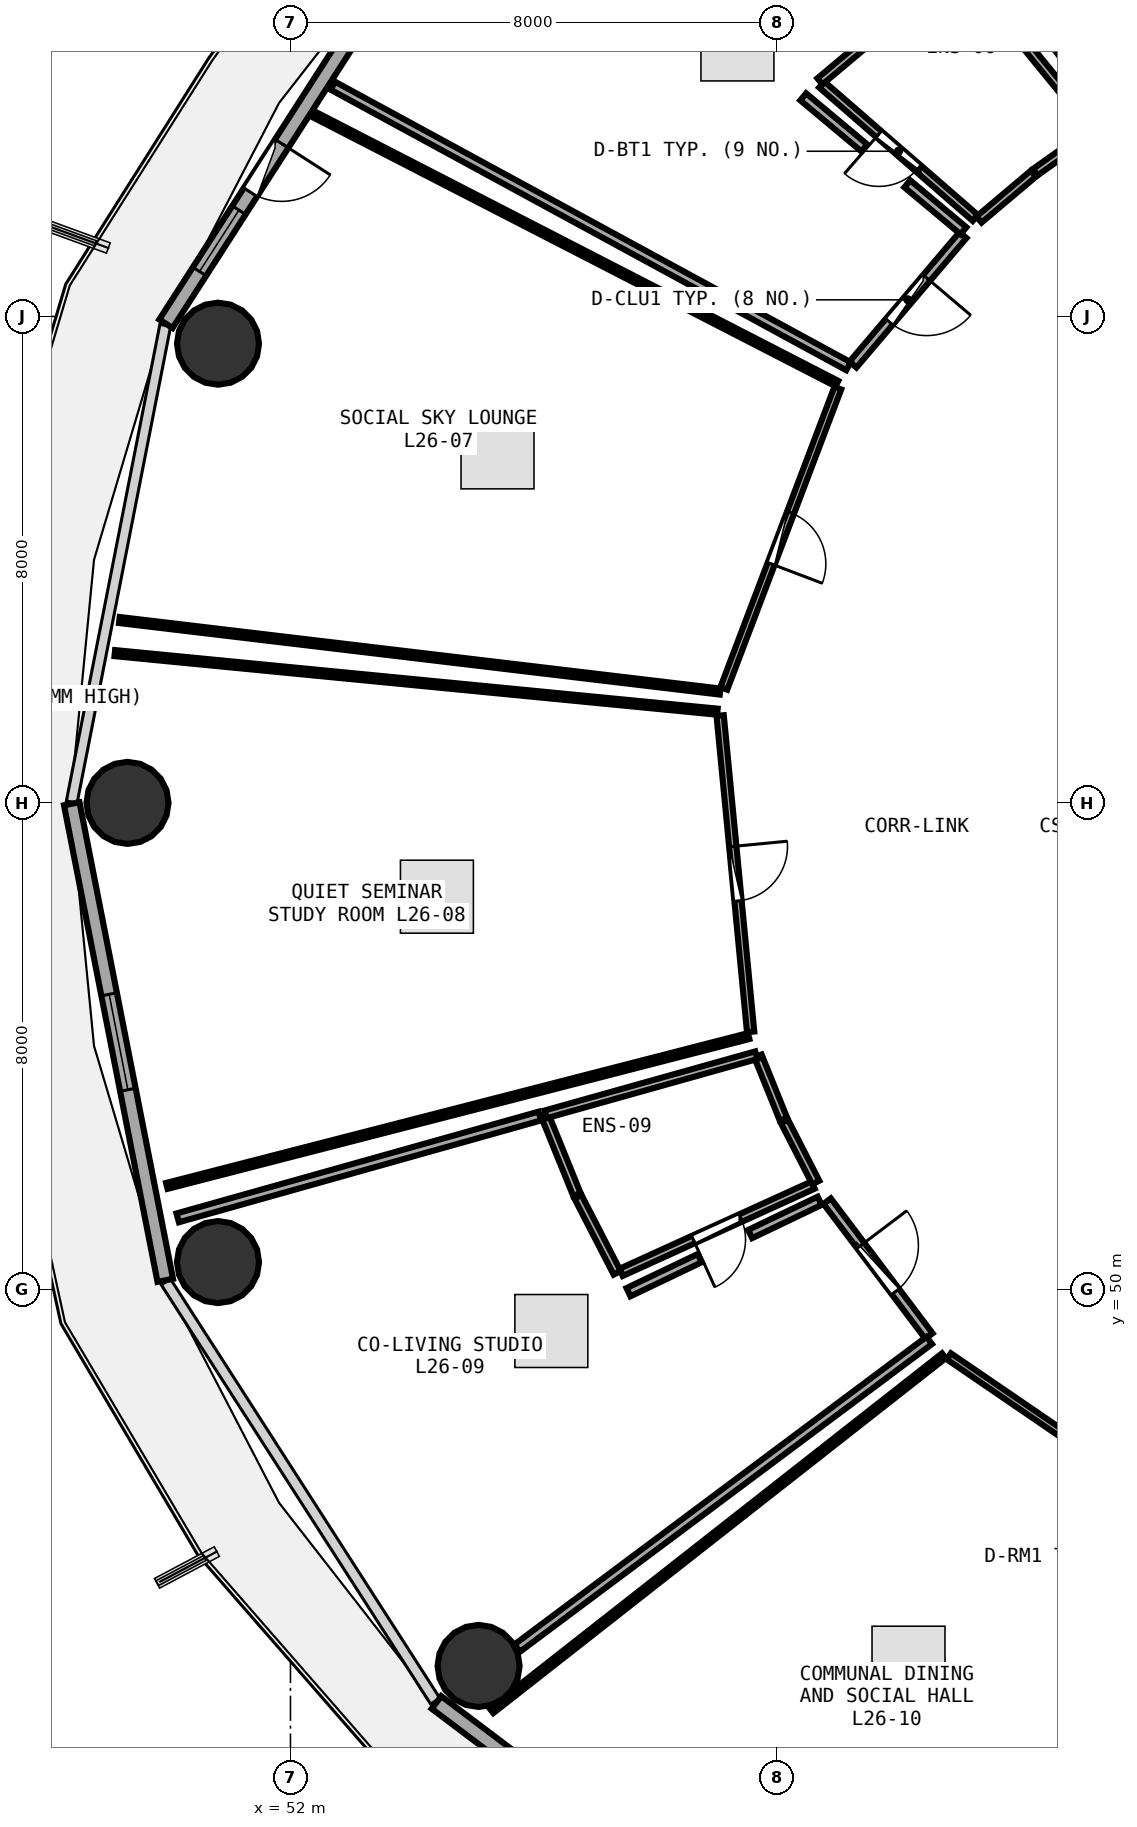
"""IFC4 building model, lengths in metres.
Left out: names, types, materials, properties, quantities, classifications, styles, units other than length and angle.
Written with IfcOpenShell. Run it as: python <this file> out.ifc"""

import sys

from ifc_helpers import new_model, si_unit, direction, frame, frame_2d, origin, origin_2d, place, context, subcontext, project, spatial, rectangle, circle, extrude, element, fill, save


model = new_model("IFC4")
c1 = context("Model", 3, precision=1e-05, world=origin(), true_north=direction((0.0, 1.0)))
c2 = subcontext(c1, "Body", "Model", "MODEL_VIEW")
j1 = project(units=[si_unit("LENGTHUNIT", "METRE"), si_unit("PLANEANGLEUNIT", "RADIAN")], contexts=[c1])
p1 = place(None, origin())
s1 = spatial("IfcSite", under=j1, at=p1, CompositionType="ELEMENT")
p2 = place(p1, origin())
s2 = spatial("IfcBuilding", under=s1, at=p2, CompositionType="ELEMENT")
p3 = place(p2, frame((0.0, 0.0, 102.6)))
s3 = spatial("IfcBuildingStorey", under=s2, at=p3, CompositionType="ELEMENT", Elevation=102.6)
for number, where, z_axis, x_axis in (
    (1, (50.808, 65.552, 0.0), (0.0, 0.0, 1.0), (1.0, 0.0, 0.0)),
    (2, (49.32, 58.0, 0.0), (0.0, 0.0, 1.0), (1.0, 0.0, 0.0)),
    (3, (50.808, 50.448, 0.0), (0.0, 0.0, 1.0), (1.0, 0.0, 0.0)),
    (4, (55.094, 43.807, 0.0), (0.0, 0.0, 1.0), (1.0, 0.0, 0.0)),
):
    element("IfcColumn", number, at=place(p3, frame(where, z_axis=z_axis, x_axis=x_axis)), inside=s3, PredefinedType="COLUMN", context=c2, shape_type="SweptSolid", body=[
        extrude(circle(Radius=0.675, at=origin_2d()), origin(), (0.0, 0.0, 1.0), 3.75),
    ])
p4 = place(p3, frame((54.381, 72.771, 0.0), z_axis=(0.0, 0.0, 1.0), x_axis=(-0.540620528459, -0.841266571432, 0.0)))
e5 = element("IfcWall", 5, at=p4, inside=s3, PredefinedType="SOLIDWALL", context=c2, shape_type="SweptSolid", body=[
    extrude(rectangle(XDim=8.193, YDim=0.26, at=frame_2d((4.096, 0.0))), origin(), (0.0, 0.0, 1.0), 3.475),
])
p5 = place(p4, frame((4.671, 0.0, 0.0)))
e6 = element("IfcOpeningElement", 6, at=p5, cuts=e5, PredefinedType="OPENING", context=c2, shape_type="SweptSolid", body=[
    extrude(rectangle(XDim=0.95, YDim=2.1, at=frame_2d((0.475, 1.05))), frame((0.0, 0.14, 0.0), z_axis=(0.0, -1.0, 0.0), x_axis=(1.0, 0.0, 0.0)), (0.0, 0.0, 1.0), 0.28),
])
p6 = place(p4, frame((5.971, 0.0, 0.85)))
e7 = element("IfcOpeningElement", 7, at=p6, cuts=e5, PredefinedType="OPENING", context=c2, shape_type="SweptSolid", body=[
    extrude(rectangle(XDim=1.2, YDim=1.45, at=frame_2d((0.6, 0.725))), frame((0.0, 0.14, 0.0), z_axis=(0.0, -1.0, 0.0), x_axis=(1.0, 0.0, 0.0)), (0.0, 0.0, 1.0), 0.28),
])
p7 = place(p3, frame((48.403, 57.985, 0.0), z_axis=(0.0, 0.0, 1.0), x_axis=(0.192581843632, -0.981280914674, 0.0)))
e8 = element("IfcWall", 8, at=p7, inside=s3, PredefinedType="SOLIDWALL", context=c2, shape_type="SweptSolid", body=[
    extrude(rectangle(XDim=7.987, YDim=0.26, at=frame_2d((3.993, 0.0))), origin(), (0.0, 0.0, 1.0), 3.475),
])
p8 = place(p7, frame((3.193, 0.0, 0.85)))
e9 = element("IfcOpeningElement", 9, at=p8, cuts=e8, PredefinedType="OPENING", context=c2, shape_type="SweptSolid", body=[
    extrude(rectangle(XDim=1.6, YDim=1.45, at=frame_2d((0.8, 0.725))), frame((0.0, 0.14, 0.0), z_axis=(0.0, -1.0, 0.0), x_axis=(1.0, 0.0, 0.0)), (0.0, 0.0, 1.0), 0.28),
])
p9 = place(p3, frame((54.401, 43.207, 0.0), z_axis=(0.0, 0.0, 1.0), x_axis=(0.798501507879, -0.601992808857, 0.0)))
e10 = element("IfcWall", 10, at=p9, inside=s3, PredefinedType="SOLIDWALL", context=c2, shape_type="SweptSolid", body=[
    extrude(rectangle(XDim=8.499, YDim=0.26, at=frame_2d((4.25, 0.0))), origin(), (0.0, 0.0, 1.0), 3.475),
])
p10 = place(p9, frame((3.45, 0.0, 0.85)))
e11 = element("IfcOpeningElement", 11, at=p10, cuts=e10, PredefinedType="OPENING", context=c2, shape_type="SweptSolid", body=[
    extrude(rectangle(XDim=1.6, YDim=1.45, at=frame_2d((0.8, 0.725))), frame((0.0, 0.14, 0.0), z_axis=(0.0, -1.0, 0.0), x_axis=(1.0, 0.0, 0.0)), (0.0, 0.0, 1.0), 0.28),
])
p11 = place(p3, frame((63.264, 67.619, 0.0), z_axis=(0.0, 0.0, 1.0), x_axis=(-0.75497608509, 0.65575232439, 0.0)))
e12 = element("IfcWall", 12, at=p11, inside=s3, PredefinedType="PLUMBINGWALL", context=c2, shape_type="SweptSolid", body=[
    extrude(rectangle(XDim=3.346, YDim=0.13, at=frame_2d((1.673, 0.0))), origin(), (0.0, 0.0, 1.0), 3.235),
])
p12 = place(p11, frame((1.243, 0.0, 0.0)))
e13 = element("IfcOpeningElement", 13, at=p12, cuts=e12, PredefinedType="OPENING", context=c2, shape_type="SweptSolid", body=[
    extrude(rectangle(XDim=0.86, YDim=2.05, at=frame_2d((0.43, 1.025))), frame((0.0, 0.075, 0.0), z_axis=(0.0, -1.0, 0.0), x_axis=(1.0, 0.0, 0.0)), (0.0, 0.0, 1.0), 0.15),
])
p13 = place(p3, frame((63.06, 67.337, 0.0), z_axis=(0.0, 0.0, 1.0), x_axis=(-0.647519081114, -0.762049236988, 0.0)))
e14 = element("IfcWall", 14, at=p13, inside=s3, PredefinedType="PARTITIONING", context=c2, shape_type="SweptSolid", body=[
    extrude(rectangle(XDim=2.795, YDim=0.15, at=frame_2d((1.397, 0.0))), origin(), (0.0, 0.0, 1.0), 2.925),
])
p14 = place(p13, frame((0.922, 0.0, 0.0)))
e15 = element("IfcOpeningElement", 15, at=p14, cuts=e14, PredefinedType="OPENING", context=c2, shape_type="SweptSolid", body=[
    extrude(rectangle(XDim=0.95, YDim=2.08, at=frame_2d((0.475, 1.04))), frame((0.0, 0.085, 0.0), z_axis=(0.0, -1.0, 0.0), x_axis=(1.0, 0.0, 0.0)), (0.0, 0.0, 1.0), 0.17),
])
p15 = place(p3, frame((61.002, 64.821, 0.0), z_axis=(0.0, 0.0, 1.0), x_axis=(-0.354853458438, -0.934921934193, 0.0)))
e16 = element("IfcWall", 16, at=p15, inside=s3, PredefinedType="PARTITIONING", context=c2, shape_type="SweptSolid", body=[
    extrude(rectangle(XDim=5.282, YDim=0.12, at=frame_2d((2.641, 0.0))), origin(), (0.0, 0.0, 1.0), 3.235),
])
p16 = place(p15, frame((2.191, 0.0, 0.0)))
e17 = element("IfcOpeningElement", 17, at=p16, cuts=e16, PredefinedType="OPENING", context=c2, shape_type="SweptSolid", body=[
    extrude(rectangle(XDim=0.9, YDim=2.08, at=frame_2d((0.45, 1.04))), frame((0.0, 0.07, 0.0), z_axis=(0.0, -1.0, 0.0), x_axis=(1.0, 0.0, 0.0)), (0.0, 0.0, 1.0), 0.14),
])
p17 = place(p3, frame((59.067, 59.436, 0.0), z_axis=(0.0, 0.0, 1.0), x_axis=(0.095913591475, -0.995389663886, 0.0)))
e18 = element("IfcWall", 18, at=p17, inside=s3, PredefinedType="PARTITIONING", context=c2, shape_type="SweptSolid", body=[
    extrude(rectangle(XDim=5.226, YDim=0.12, at=frame_2d((2.613, 0.0))), origin(), (0.0, 0.0, 1.0), 2.925),
])
p18 = place(p17, frame((2.163, 0.0, 0.0)))
e19 = element("IfcOpeningElement", 19, at=p18, cuts=e18, PredefinedType="OPENING", context=c2, shape_type="SweptSolid", body=[
    extrude(rectangle(XDim=0.9, YDim=2.08, at=frame_2d((0.45, 1.04))), frame((0.0, 0.07, 0.0), z_axis=(0.0, -1.0, 0.0), x_axis=(1.0, 0.0, 0.0)), (0.0, 0.0, 1.0), 0.14),
])
p19 = place(p3, frame((60.594, 51.714, 0.0), z_axis=(0.0, 0.0, 1.0), x_axis=(-0.910380938799, -0.413771127885, 0.0)))
e20 = element("IfcWall", 20, at=p19, inside=s3, PredefinedType="PLUMBINGWALL", context=c2, shape_type="SweptSolid", body=[
    extrude(rectangle(XDim=3.469, YDim=0.13, at=frame_2d((1.734, 0.0))), origin(), (0.0, 0.0, 1.0), 2.925),
])
p20 = place(p19, frame((1.304, 0.0, 0.0)))
e21 = element("IfcOpeningElement", 21, at=p20, cuts=e20, PredefinedType="OPENING", context=c2, shape_type="SweptSolid", body=[
    extrude(rectangle(XDim=0.86, YDim=2.05, at=frame_2d((0.43, 1.025))), frame((0.0, 0.075, 0.0), z_axis=(0.0, -1.0, 0.0), x_axis=(1.0, 0.0, 0.0)), (0.0, 0.0, 1.0), 0.15),
])
p21 = place(p3, frame((60.827, 51.45, 0.0), z_axis=(0.0, 0.0, 1.0), x_axis=(0.602330864847, -0.798246534131, 0.0)))
e22 = element("IfcWall", 22, at=p21, inside=s3, PredefinedType="PARTITIONING", context=c2, shape_type="SweptSolid", body=[
    extrude(rectangle(XDim=2.779, YDim=0.15, at=frame_2d((1.389, 0.0))), origin(), (0.0, 0.0, 1.0), 2.925),
])
p22 = place(p21, frame((0.914, 0.0, 0.0)))
e23 = element("IfcOpeningElement", 23, at=p22, cuts=e22, PredefinedType="OPENING", context=c2, shape_type="SweptSolid", body=[
    extrude(rectangle(XDim=0.95, YDim=2.08, at=frame_2d((0.475, 1.04))), frame((0.0, 0.085, 0.0), z_axis=(0.0, -1.0, 0.0), x_axis=(1.0, 0.0, 0.0)), (0.0, 0.0, 1.0), 0.17),
])
p23 = place(p3, frame((62.827, 48.899, 0.0), z_axis=(0.0, 0.0, 1.0), x_axis=(0.825618475233, -0.564228795219, 0.0)))
e24 = element("IfcWall", 24, at=p23, inside=s3, PredefinedType="PARTITIONING", context=c2, shape_type="SweptSolid", body=[
    extrude(rectangle(XDim=5.578, YDim=0.12, at=frame_2d((2.789, 0.0))), origin(), (0.0, 0.0, 1.0), 2.925),
])
p24 = place(p23, frame((2.339, 0.0, 0.0)))
e25 = element("IfcOpeningElement", 25, at=p24, cuts=e24, PredefinedType="OPENING", context=c2, shape_type="SweptSolid", body=[
    extrude(rectangle(XDim=0.9, YDim=2.08, at=frame_2d((0.45, 1.04))), frame((0.0, 0.07, 0.0), z_axis=(0.0, -1.0, 0.0), x_axis=(1.0, 0.0, 0.0)), (0.0, 0.0, 1.0), 0.14),
])
p25 = place(p3, frame((65.506, 69.292, 0.0), z_axis=(0.0, 0.0, 1.0), x_axis=(-0.612364923916, 0.790575233585, 0.0)))
e26 = element("IfcWall", 26, at=p25, inside=s3, PredefinedType="PARTITIONING", context=c2, shape_type="SweptSolid", body=[
    extrude(rectangle(XDim=9.168, YDim=0.15, at=frame_2d((4.584, 0.0))), origin(), (0.0, 0.0, 1.0), 2.925),
])
p26 = place(p3, frame((65.213, 69.057, 0.0), z_axis=(0.0, 0.0, 1.0), x_axis=(-0.814779575245, -0.579770854531, 0.0)))
e27 = element("IfcWall", 27, at=p26, inside=s3, PredefinedType="PLUMBINGWALL", context=c2, shape_type="SweptSolid", body=[
    extrude(rectangle(XDim=1.181, YDim=0.13, at=frame_2d((0.591, 0.0))), origin(), (0.0, 0.0, 1.0), 2.925),
])
p27 = place(p3, frame((64.219, 68.348, 0.0), z_axis=(0.0, 0.0, 1.0), x_axis=(-0.764137277769, -0.645053657244, 0.0)))
e28 = element("IfcWall", 28, at=p27, inside=s3, PredefinedType="PLUMBINGWALL", context=c2, shape_type="SweptSolid", body=[
    extrude(rectangle(XDim=1.171, YDim=0.13, at=frame_2d((0.585, 0.0))), origin(), (0.0, 0.0, 1.0), 3.48),
])
p28 = place(p3, frame((60.707, 69.866, 0.0), z_axis=(0.0, 0.0, 1.0), x_axis=(0.766482767596, 0.642264872913, 0.0)))
e29 = element("IfcWall", 29, at=p28, inside=s3, PredefinedType="PLUMBINGWALL", context=c2, shape_type="SweptSolid", body=[
    extrude(rectangle(XDim=1.464, YDim=0.13, at=frame_2d((0.732, 0.0))), origin(), (0.0, 0.0, 1.0), 3.48),
])
p29 = place(p3, frame((63.096, 71.679, 0.0), z_axis=(0.0, 0.0, 1.0), x_axis=(0.632781461548, -0.774330434583, 0.0)))
e30 = element("IfcWall", 30, at=p29, inside=s3, PredefinedType="PLUMBINGWALL", context=c2, shape_type="SweptSolid", body=[
    extrude(rectangle(XDim=3.351, YDim=0.13, at=frame_2d((1.676, 0.0))), origin(), (0.0, 0.0, 1.0), 2.925),
])
p30 = place(p3, frame((61.177, 65.181, 0.0), z_axis=(0.0, 0.0, 1.0), x_axis=(-0.878445909545, 0.477841798092, 0.0)))
e31 = element("IfcWall", 31, at=p30, inside=s3, PredefinedType="PARTITIONING", context=c2, shape_type="SweptSolid", body=[
    extrude(rectangle(XDim=9.653, YDim=0.15, at=frame_2d((4.827, 0.0))), origin(), (0.0, 0.0, 1.0), 2.925),
])
p31 = place(p3, frame((60.433, 69.611, 0.0), z_axis=(0.0, 0.0, 1.0), x_axis=(0.767335111176, -0.641246307714, 0.0)))
e32 = element("IfcWall", 32, at=p31, inside=s3, PredefinedType="PARTITIONING", context=c2, shape_type="SweptSolid", body=[
    extrude(rectangle(XDim=1.311, YDim=0.15, at=frame_2d((0.655, 0.0))), origin(), (0.0, 0.0, 1.0), 3.48),
])
p32 = place(p3, frame((62.145, 68.181, 0.0), z_axis=(0.0, 0.0, 1.0), x_axis=(0.767356229846, -0.641221035616, 0.0)))
e33 = element("IfcWall", 33, at=p32, inside=s3, PredefinedType="PARTITIONING", context=c2, shape_type="SweptSolid", body=[
    extrude(rectangle(XDim=1.204, YDim=0.15, at=frame_2d((0.602, 0.0))), origin(), (0.0, 0.0, 1.0), 3.235),
])
p33 = place(p3, frame((59.066, 59.831, 0.0), z_axis=(0.0, 0.0, 1.0), x_axis=(-0.99298532521, 0.118237658624, 0.0)))
e34 = element("IfcWall", 34, at=p33, inside=s3, PredefinedType="PARTITIONING", context=c2, shape_type="SweptSolid", body=[
    extrude(rectangle(XDim=9.95, YDim=0.1, at=frame_2d((4.975, 0.0))), origin(), (0.0, 0.0, 1.0), 2.975),
])
p34 = place(p3, frame((52.382, 69.324, 0.0), z_axis=(0.0, 0.0, 1.0), x_axis=(0.889175506344, -0.457566300025, 0.0)))
e35 = element("IfcWall", 35, at=p34, inside=s3, PredefinedType="PARTITIONING", context=c2, shape_type="SweptSolid", body=[
    extrude(rectangle(XDim=9.678, YDim=0.1, at=frame_2d((4.839, 0.0))), origin(), (0.0, 0.0, 1.0), 2.925),
])
p35 = place(p3, frame((59.535, 54.165, 0.0), z_axis=(0.0, 0.0, 1.0), x_axis=(-0.968404670054, -0.249384031201, 0.0)))
e36 = element("IfcWall", 36, at=p35, inside=s3, PredefinedType="PARTITIONING", context=c2, shape_type="SweptSolid", body=[
    extrude(rectangle(XDim=9.881, YDim=0.1, at=frame_2d((4.94, 0.0))), origin(), (0.0, 0.0, 1.0), 2.975),
])
p36 = place(p3, frame((49.111, 60.463, 0.0), z_axis=(0.0, 0.0, 1.0), x_axis=(0.995310801703, -0.096728527399, 0.0)))
e37 = element("IfcWall", 37, at=p36, inside=s3, PredefinedType="PARTITIONING", context=c2, shape_type="SweptSolid", body=[
    extrude(rectangle(XDim=9.957, YDim=0.1, at=frame_2d((4.979, 0.0))), origin(), (0.0, 0.0, 1.0), 2.975),
])
p37 = place(p3, frame((59.688, 53.837, 0.0), z_axis=(0.0, 0.0, 1.0), x_axis=(0.374466649307, -0.927240383372, 0.0)))
e38 = element("IfcWall", 38, at=p37, inside=s3, PredefinedType="PLUMBINGWALL", context=c2, shape_type="SweptSolid", body=[
    extrude(rectangle(XDim=1.121, YDim=0.13, at=frame_2d((0.561, 0.0))), origin(), (0.0, 0.0, 1.0), 3.235),
])
p38 = place(p3, frame((60.125, 52.761, 0.0), z_axis=(0.0, 0.0, 1.0), x_axis=(0.456189291516, -0.889882762113, 0.0)))
e39 = element("IfcWall", 39, at=p38, inside=s3, PredefinedType="PLUMBINGWALL", context=c2, shape_type="SweptSolid", body=[
    extrude(rectangle(XDim=1.129, YDim=0.13, at=frame_2d((0.564, 0.0))), origin(), (0.0, 0.0, 1.0), 3.235),
])
p39 = place(p3, frame((57.373, 50.272, 0.0), z_axis=(0.0, 0.0, 1.0), x_axis=(-0.458147751042, 0.888876053348, 0.0)))
e40 = element("IfcWall", 40, at=p39, inside=s3, PredefinedType="PLUMBINGWALL", context=c2, shape_type="SweptSolid", body=[
    extrude(rectangle(XDim=1.407, YDim=0.13, at=frame_2d((0.703, 0.0))), origin(), (0.0, 0.0, 1.0), 2.925),
])
p40 = place(p3, frame((56.711, 51.559, 0.0), z_axis=(0.0, 0.0, 1.0), x_axis=(-0.376021150564, 0.926611080405, 0.0)))
e41 = element("IfcWall", 41, at=p40, inside=s3, PredefinedType="PLUMBINGWALL", context=c2, shape_type="SweptSolid", body=[
    extrude(rectangle(XDim=1.398, YDim=0.13, at=frame_2d((0.699, 0.0))), origin(), (0.0, 0.0, 1.0), 3.175),
])
p41 = place(p3, frame((56.197, 52.878, 0.0), z_axis=(0.0, 0.0, 1.0), x_axis=(0.962808829557, 0.270183563023, 0.0)))
e42 = element("IfcWall", 42, at=p41, inside=s3, PredefinedType="PLUMBINGWALL", context=c2, shape_type="SweptSolid", body=[
    extrude(rectangle(XDim=3.598, YDim=0.13, at=frame_2d((1.799, 0.0))), origin(), (0.0, 0.0, 1.0), 3.175),
])
p42 = place(p3, frame((62.505, 49.16, 0.0), z_axis=(0.0, 0.0, 1.0), x_axis=(-0.801231684565, -0.598354232582, 0.0)))
e43 = element("IfcWall", 43, at=p42, inside=s3, PredefinedType="PARTITIONING", context=c2, shape_type="SweptSolid", body=[
    extrude(rectangle(XDim=8.456, YDim=0.15, at=frame_2d((4.228, 0.0))), origin(), (0.0, 0.0, 1.0), 2.925),
])
p43 = place(p3, frame((50.146, 51.176, 0.0), z_axis=(0.0, 0.0, 1.0), x_axis=(0.962685643461, 0.270622157028, 0.0)))
e44 = element("IfcWall", 44, at=p43, inside=s3, PredefinedType="PARTITIONING", context=c2, shape_type="SweptSolid", body=[
    extrude(rectangle(XDim=6.187, YDim=0.15, at=frame_2d((3.094, 0.0))), origin(), (0.0, 0.0, 1.0), 2.975),
])
p44 = place(p3, frame((57.559, 49.953, 0.0), z_axis=(0.0, 0.0, 1.0), x_axis=(0.902185129063, 0.431349038364, 0.0)))
e45 = element("IfcWall", 45, at=p44, inside=s3, PredefinedType="PARTITIONING", context=c2, shape_type="SweptSolid", body=[
    extrude(rectangle(XDim=1.298, YDim=0.15, at=frame_2d((0.649, 0.0))), origin(), (0.0, 0.0, 1.0), 3.175),
])
p45 = place(p3, frame((59.561, 50.91, 0.0), z_axis=(0.0, 0.0, 1.0), x_axis=(0.902228812368, 0.431257660955, 0.0)))
e46 = element("IfcWall", 46, at=p45, inside=s3, PredefinedType="PARTITIONING", context=c2, shape_type="SweptSolid", body=[
    extrude(rectangle(XDim=1.266, YDim=0.15, at=frame_2d((0.633, 0.0))), origin(), (0.0, 0.0, 1.0), 2.925),
])
p46 = place(p3, frame((67.463, 45.683, 0.0), z_axis=(0.0, 0.0, 1.0), x_axis=(-0.479571724153, -0.87750268455, 0.0)))
e47 = element("IfcWall", 47, at=p46, inside=s3, PredefinedType="PARTITIONING", context=c2, shape_type="SweptSolid", body=[
    extrude(rectangle(XDim=9.007, YDim=0.1, at=frame_2d((4.503, 0.0))), origin(), (0.0, 0.0, 1.0), 2.925),
])
p47 = place(p3, frame((55.305, 43.071, 0.0), z_axis=(0.0, 0.0, 1.0), x_axis=(0.78679196563, 0.6172182781, 0.0)))
e48 = element("IfcWall", 48, at=p47, inside=s3, PredefinedType="PARTITIONING", context=c2, shape_type="SweptSolid", body=[
    extrude(rectangle(XDim=9.458, YDim=0.1, at=frame_2d((4.729, 0.0))), origin(), (0.0, 0.0, 1.0), 2.925),
])
p48 = place(p3, frame((63.697, 37.548, 0.0), z_axis=(0.0, 0.0, 1.0), x_axis=(0.456266444918, 0.889843205987, 0.0)))
e49 = element("IfcWall", 49, at=p48, inside=s3, PredefinedType="PARTITIONING", context=c2, shape_type="SweptSolid", body=[
    extrude(rectangle(XDim=8.985, YDim=0.1, at=frame_2d((4.492, 0.0))), origin(), (0.0, 0.0, 1.0), 2.925),
])
p49 = place(p5, frame((0.95, 0.0, 0.0), z_axis=(0.0, 0.0, 1.0), x_axis=(-1.0, 0.0, 0.0)))
e50 = element("IfcDoor", 50, at=p49, inside=s3, OperationType="SINGLE_SWING_RIGHT", PredefinedType="DOOR", context=c2, shape_type="SweptSolid", body=[
    extrude(rectangle(XDim=0.95, YDim=2.1, at=frame_2d((0.475, 1.05))), frame((0.0, 0.025, 0.0), z_axis=(0.0, -1.0, 0.0), x_axis=(1.0, 0.0, 0.0)), (0.0, 0.0, 1.0), 0.05),
])
fill(e6, e50)
p50 = place(p6, origin())
e51 = element("IfcWindow", 51, at=p50, inside=s3, PartitioningType="SINGLE_PANEL", PredefinedType="WINDOW", context=c2, shape_type="SweptSolid", body=[
    extrude(rectangle(XDim=1.2, YDim=1.45, at=frame_2d((0.6, 0.725))), frame((0.0, 0.03, 0.0), z_axis=(0.0, -1.0, 0.0), x_axis=(1.0, 0.0, 0.0)), (0.0, 0.0, 1.0), 0.06),
])
fill(e7, e51)
p51 = place(p8, origin())
e52 = element("IfcWindow", 52, at=p51, inside=s3, PartitioningType="SINGLE_PANEL", PredefinedType="WINDOW", context=c2, shape_type="SweptSolid", body=[
    extrude(rectangle(XDim=1.6, YDim=1.45, at=frame_2d((0.8, 0.725))), frame((0.0, 0.03, 0.0), z_axis=(0.0, -1.0, 0.0), x_axis=(1.0, 0.0, 0.0)), (0.0, 0.0, 1.0), 0.06),
])
fill(e9, e52)
p52 = place(p12, origin())
e53 = element("IfcDoor", 53, at=p52, inside=s3, OperationType="SINGLE_SWING_RIGHT", PredefinedType="DOOR", context=c2, shape_type="SweptSolid", body=[
    extrude(rectangle(XDim=0.86, YDim=2.05, at=frame_2d((0.43, 1.025))), frame((0.0, 0.025, 0.0), z_axis=(0.0, -1.0, 0.0), x_axis=(1.0, 0.0, 0.0)), (0.0, 0.0, 1.0), 0.05),
])
fill(e13, e53)
p53 = place(p14, origin())
e54 = element("IfcDoor", 54, at=p53, inside=s3, OperationType="SINGLE_SWING_LEFT", PredefinedType="DOOR", context=c2, shape_type="SweptSolid", body=[
    extrude(rectangle(XDim=0.95, YDim=2.08, at=frame_2d((0.475, 1.04))), frame((0.0, 0.025, 0.0), z_axis=(0.0, -1.0, 0.0), x_axis=(1.0, 0.0, 0.0)), (0.0, 0.0, 1.0), 0.05),
])
fill(e15, e54)
p54 = place(p16, origin())
e55 = element("IfcDoor", 55, at=p54, inside=s3, OperationType="SINGLE_SWING_RIGHT", PredefinedType="DOOR", context=c2, shape_type="SweptSolid", body=[
    extrude(rectangle(XDim=0.9, YDim=2.08, at=frame_2d((0.45, 1.04))), frame((0.0, 0.025, 0.0), z_axis=(0.0, -1.0, 0.0), x_axis=(1.0, 0.0, 0.0)), (0.0, 0.0, 1.0), 0.05),
])
fill(e17, e55)
p55 = place(p18, origin())
e56 = element("IfcDoor", 56, at=p55, inside=s3, OperationType="SINGLE_SWING_LEFT", PredefinedType="DOOR", context=c2, shape_type="SweptSolid", body=[
    extrude(rectangle(XDim=0.9, YDim=2.08, at=frame_2d((0.45, 1.04))), frame((0.0, 0.025, 0.0), z_axis=(0.0, -1.0, 0.0), x_axis=(1.0, 0.0, 0.0)), (0.0, 0.0, 1.0), 0.05),
])
fill(e19, e56)
p56 = place(p20, origin())
e57 = element("IfcDoor", 57, at=p56, inside=s3, OperationType="SINGLE_SWING_RIGHT", PredefinedType="DOOR", context=c2, shape_type="SweptSolid", body=[
    extrude(rectangle(XDim=0.86, YDim=2.05, at=frame_2d((0.43, 1.025))), frame((0.0, 0.025, 0.0), z_axis=(0.0, -1.0, 0.0), x_axis=(1.0, 0.0, 0.0)), (0.0, 0.0, 1.0), 0.05),
])
fill(e21, e57)
p57 = place(p22, origin())
e58 = element("IfcDoor", 58, at=p57, inside=s3, OperationType="SINGLE_SWING_LEFT", PredefinedType="DOOR", context=c2, shape_type="SweptSolid", body=[
    extrude(rectangle(XDim=0.95, YDim=2.08, at=frame_2d((0.475, 1.04))), frame((0.0, 0.025, 0.0), z_axis=(0.0, -1.0, 0.0), x_axis=(1.0, 0.0, 0.0)), (0.0, 0.0, 1.0), 0.05),
])
fill(e23, e58)
save(model, sys.argv[1])
